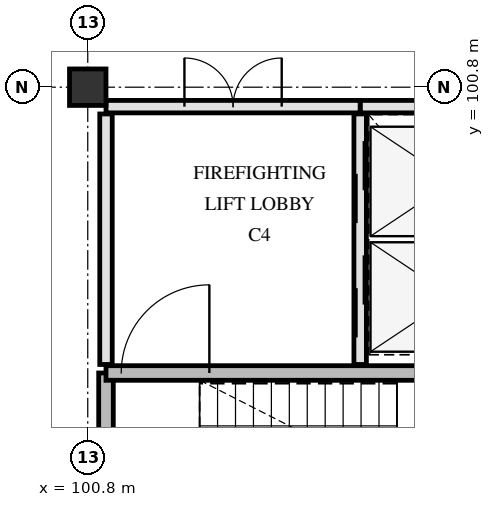
"""IFC4 building model, lengths in metres.
Left out: names, types, materials, properties, quantities, classifications, styles, units other than length and angle.
Written with IfcOpenShell. Run it as: python <this file> out.ifc"""

import sys

from ifc_helpers import new_model, si_unit, direction, frame, frame_2d, origin, origin_2d, place, context, subcontext, project, spatial, rectangle, extrude, element, fill, save


model = new_model("IFC4")
c1 = context("Model", 3, precision=1e-05, world=origin(), true_north=direction((0.0, 1.0)))
c2 = subcontext(c1, "Body", "Model", "MODEL_VIEW")
j1 = project(units=[si_unit("LENGTHUNIT", "METRE"), si_unit("PLANEANGLEUNIT", "RADIAN")], contexts=[c1])
p1 = place(None, origin())
s1 = spatial("IfcSite", under=j1, at=p1, CompositionType="ELEMENT")
p2 = place(p1, origin())
s2 = spatial("IfcBuilding", under=s1, at=p2, CompositionType="ELEMENT")
p3 = place(p2, frame((0.0, 0.0, 18.6)))
s3 = spatial("IfcBuildingStorey", under=s2, at=p3, CompositionType="ELEMENT", Elevation=18.6)
p4 = place(p3, frame((100.8, 100.8, 0.0), z_axis=(0.0, 0.0, 1.0), x_axis=(1.0, 0.0, 0.0)))
e1 = element("IfcColumn", 1, at=p4, inside=s3, PredefinedType="COLUMN", context=c2, shape_type="SweptSolid", body=[
    extrude(rectangle(XDim=0.6, YDim=0.6, at=origin_2d()), origin(), (0.0, 0.0, 1.0), 3.9),
])
p5 = place(p3, frame((101.1, 92.78, 0.0), z_axis=(0.0, 0.0, 1.0), x_axis=(0.0, 1.0, 0.0)))
e2 = element("IfcWall", 2, at=p5, inside=s3, PredefinedType="SHEAR", context=c2, shape_type="SweptSolid", body=[
    extrude(rectangle(XDim=3.32, YDim=0.24, at=frame_2d((1.66, 0.0))), origin(), (0.0, 0.0, 1.0), 3.62),
])
p6 = place(p3, frame((101.1, 96.1, 0.0), z_axis=(0.0, 0.0, 1.0), x_axis=(1.0, 0.0, 0.0)))
e3 = element("IfcWall", 3, at=p6, inside=s3, PredefinedType="SHEAR", context=c2, shape_type="SweptSolid", body=[
    extrude(rectangle(XDim=7.82, YDim=0.24, at=frame_2d((3.91, 0.0))), origin(), (0.0, 0.0, 1.0), 3.62),
])
p7 = place(p6, frame((0.25, 0.0, 0.0)))
e4 = element("IfcOpeningElement", 4, at=p7, cuts=e3, PredefinedType="OPENING", context=c2, shape_type="SweptSolid", body=[
    extrude(rectangle(XDim=1.45, YDim=2.2, at=frame_2d((0.725, 1.1))), frame((0.0, 0.13, 0.0), z_axis=(0.0, -1.0, 0.0), x_axis=(1.0, 0.0, 0.0)), (0.0, 0.0, 1.0), 0.26),
])
p8 = place(p3, frame((105.28, 96.24, 0.0), z_axis=(0.0, 0.0, 1.0), x_axis=(0.0, 1.0, 0.0)))
e5 = element("IfcWall", 5, at=p8, inside=s3, PredefinedType="PARTITIONING", context=c2, shape_type="SweptSolid", body=[
    extrude(rectangle(XDim=4.12, YDim=0.205, at=frame_2d((2.06, 0.0))), origin(), (0.0, 0.0, 1.0), 3.61),
])
p9 = place(p8, frame((0.445, 0.0, 0.0)))
e6 = element("IfcOpeningElement", 6, at=p9, cuts=e5, PredefinedType="OPENING", context=c2, shape_type="SweptSolid", body=[
    extrude(rectangle(XDim=1.35, YDim=2.2, at=frame_2d((0.675, 1.1))), frame((0.0, 0.113, 0.0), z_axis=(0.0, -1.0, 0.0), x_axis=(1.0, 0.0, 0.0)), (0.0, 0.0, 1.0), 0.225),
])
p10 = place(p8, frame((2.325, 0.0, 0.0)))
e7 = element("IfcOpeningElement", 7, at=p10, cuts=e5, PredefinedType="OPENING", context=c2, shape_type="SweptSolid", body=[
    extrude(rectangle(XDim=1.35, YDim=2.2, at=frame_2d((0.675, 1.1))), frame((0.0, 0.113, 0.0), z_axis=(0.0, -1.0, 0.0), x_axis=(1.0, 0.0, 0.0)), (0.0, 0.0, 1.0), 0.225),
])
p11 = place(p3, frame((105.28, 100.48, 0.0), z_axis=(0.0, 0.0, 1.0), x_axis=(1.0, 0.0, 0.0)))
e8 = element("IfcWall", 8, at=p11, inside=s3, PredefinedType="PARTITIONING", context=c2, shape_type="SweptSolid", body=[
    extrude(rectangle(XDim=3.57, YDim=0.205, at=frame_2d((1.785, 0.0))), origin(), (0.0, 0.0, 1.0), 3.61),
])
p12 = place(p3, frame((101.1, 96.24, 0.0), z_axis=(0.0, 0.0, 1.0), x_axis=(0.0, 1.0, 0.0)))
e9 = element("IfcWall", 9, at=p12, inside=s3, PredefinedType="PARTITIONING", context=c2, shape_type="SweptSolid", body=[
    extrude(rectangle(XDim=4.12, YDim=0.205, at=frame_2d((2.06, 0.0))), origin(), (0.0, 0.0, 1.0), 3.61),
])
p13 = place(p3, frame((101.1, 100.48, 0.0), z_axis=(0.0, 0.0, 1.0), x_axis=(1.0, 0.0, 0.0)))
e10 = element("IfcWall", 10, at=p13, inside=s3, PredefinedType="PARTITIONING", context=c2, shape_type="SweptSolid", body=[
    extrude(rectangle(XDim=4.18, YDim=0.205, at=frame_2d((2.09, 0.0))), origin(), (0.0, 0.0, 1.0), 3.61),
])
p14 = place(p13, frame((1.29, 0.0, 0.0)))
e11 = element("IfcOpeningElement", 11, at=p14, cuts=e10, PredefinedType="OPENING", context=c2, shape_type="SweptSolid", body=[
    extrude(rectangle(XDim=1.6, YDim=2.25, at=frame_2d((0.8, 1.125))), frame((0.0, 0.113, 0.0), z_axis=(0.0, -1.0, 0.0), x_axis=(1.0, 0.0, 0.0)), (0.0, 0.0, 1.0), 0.225),
])
p15 = place(p7, origin())
e12 = element("IfcDoor", 12, at=p15, inside=s3, OperationType="SINGLE_SWING_RIGHT", PredefinedType="DOOR", context=c2, shape_type="SweptSolid", body=[
    extrude(rectangle(XDim=1.45, YDim=2.2, at=frame_2d((0.725, 1.1))), frame((0.0, 0.025, 0.0), z_axis=(0.0, -1.0, 0.0), x_axis=(1.0, 0.0, 0.0)), (0.0, 0.0, 1.0), 0.05),
])
fill(e4, e12)
p16 = place(p9, origin())
e13 = element("IfcDoor", 13, at=p16, inside=s3, OperationType="SLIDING_TO_LEFT", PredefinedType="DOOR", context=c2, shape_type="SweptSolid", body=[
    extrude(rectangle(XDim=1.35, YDim=2.2, at=frame_2d((0.675, 1.1))), frame((0.0, 0.025, 0.0), z_axis=(0.0, -1.0, 0.0), x_axis=(1.0, 0.0, 0.0)), (0.0, 0.0, 1.0), 0.05),
])
fill(e6, e13)
p17 = place(p10, origin())
e14 = element("IfcDoor", 14, at=p17, inside=s3, OperationType="SLIDING_TO_LEFT", PredefinedType="DOOR", context=c2, shape_type="SweptSolid", body=[
    extrude(rectangle(XDim=1.35, YDim=2.2, at=frame_2d((0.675, 1.1))), frame((0.0, 0.025, 0.0), z_axis=(0.0, -1.0, 0.0), x_axis=(1.0, 0.0, 0.0)), (0.0, 0.0, 1.0), 0.05),
])
fill(e7, e14)
p18 = place(p14, origin())
e15 = element("IfcDoor", 15, at=p18, inside=s3, OperationType="DOUBLE_SWING_LEFT", PredefinedType="DOOR", context=c2, shape_type="SweptSolid", body=[
    extrude(rectangle(XDim=1.6, YDim=2.25, at=frame_2d((0.8, 1.125))), frame((0.0, 0.025, 0.0), z_axis=(0.0, -1.0, 0.0), x_axis=(1.0, 0.0, 0.0)), (0.0, 0.0, 1.0), 0.05),
])
fill(e11, e15)
save(model, sys.argv[1])
